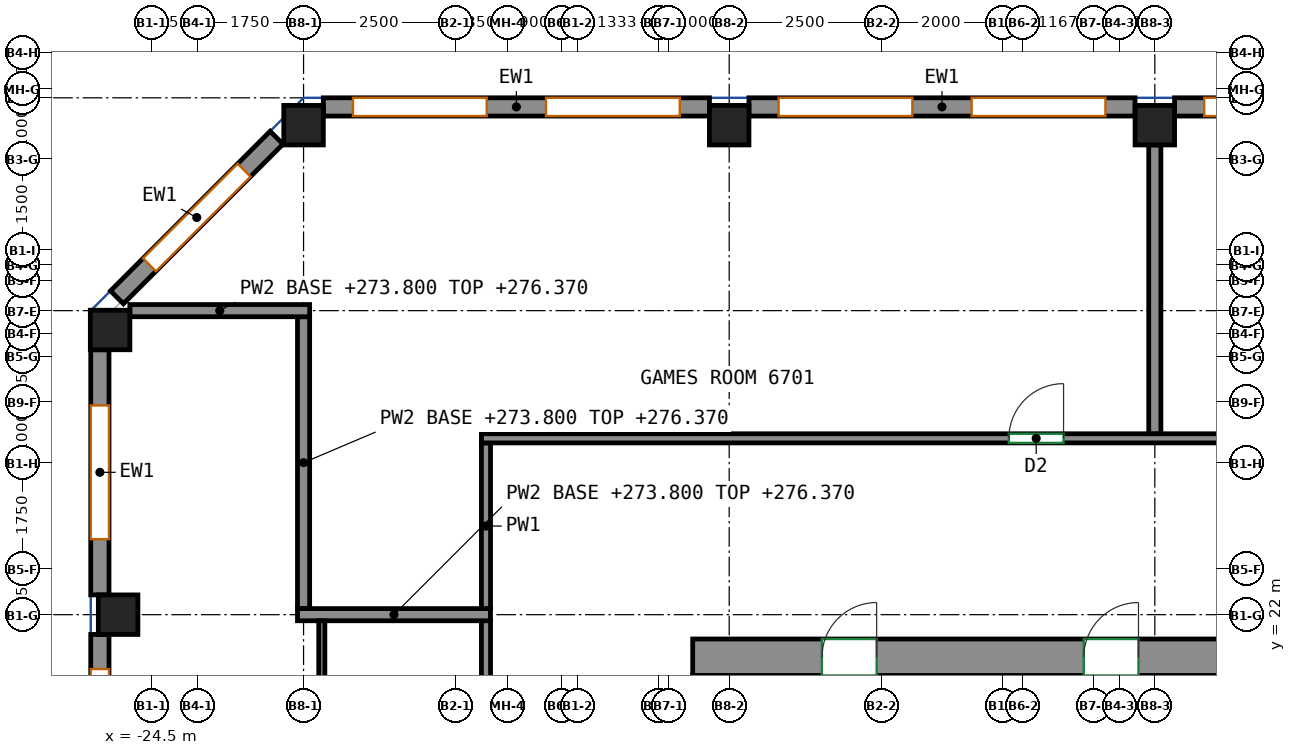
"""IFC4 building model, lengths in metres.
Left out: names, types, materials, properties, quantities, classifications, styles, units other than length and angle.
Written with IfcOpenShell. Run it as: python <this file> out.ifc"""

import sys

from ifc_helpers import new_model, si_unit, direction, frame, frame_2d, origin, origin_2d, place, context, subcontext, project, spatial, rectangle, extrude, source, transform, mapped, element, fill, save


model = new_model("IFC4")
c1 = context("Model", 3, precision=1e-05, world=origin(), true_north=direction((0.0, 1.0)))
c2 = subcontext(c1, "Body", "Model", "MODEL_VIEW")
j1 = project(units=[si_unit("LENGTHUNIT", "METRE"), si_unit("PLANEANGLEUNIT", "RADIAN")], contexts=[c1])
p1 = place(None, origin())
s1 = spatial("IfcSite", under=j1, at=p1, CompositionType="ELEMENT")
p2 = place(p1, origin())
s2 = spatial("IfcBuilding", under=s1, at=p2, CompositionType="ELEMENT")
p3 = place(p2, frame((0.0, 0.0, 273.8)))
s3 = spatial("IfcBuildingStorey", under=s2, at=p3, CompositionType="ELEMENT", Elevation=273.8)
m1 = source(origin(), c2, "Body", "SweptSolid", [
    extrude(rectangle(XDim=0.65, YDim=0.65, at=origin_2d()), origin(), (0.0, 0.0, 1.0), 3.12),
])
for number, where, z_axis, x_axis in (
    (1, (-25.182, 26.682, 0.0), (0.0, 0.0, 1.0), (1.0, 0.0, 0.0)),
    (2, (-25.05, 22.0, 0.0), (0.0, 0.0, 1.0), (1.0, 0.0, 0.0)),
    (3, (-22.0, 30.05, 0.0), (0.0, 0.0, 1.0), (1.0, 0.0, 0.0)),
    (4, (-15.0, 30.05, 0.0), (0.0, 0.0, 1.0), (1.0, 0.0, 0.0)),
    (5, (-8.0, 30.05, 0.0), (0.0, 0.0, 1.0), (1.0, 0.0, 0.0)),
):
    element("IfcColumn", number, at=place(p3, frame(where, z_axis=z_axis, x_axis=x_axis)), inside=s3, PredefinedType="COLUMN", context=c2, shape_type="MappedRepresentation", body=[
        mapped(m1, transform((0.0, 0.0, 0.0))),
    ])
m2 = source(origin(), c2, "Body", "SweptSolid", [
    extrude(rectangle(XDim=33.3, YDim=0.6, at=frame_2d((16.65, 0.0))), origin(), (0.0, 0.0, 1.0), 3.12),
])
p4 = place(p3, frame((-15.6, 21.3, 0.0), z_axis=(0.0, 0.0, 1.0), x_axis=(1.0, 0.0, 0.0)))
e6 = element("IfcWall", 6, at=p4, inside=s3, PredefinedType="SHEAR", context=c2, shape_type="MappedRepresentation", body=[
    mapped(m2, transform((0.0, 0.0, 0.0))),
])
p5 = place(p4, frame((6.431, 0.0, 0.0)))
e7 = element("IfcOpeningElement", 7, at=p5, cuts=e6, PredefinedType="OPENING", context=c2, shape_type="SweptSolid", body=[
    extrude(rectangle(XDim=0.9, YDim=2.1, at=frame_2d((0.45, 1.05))), frame((0.0, 0.31, 0.0), z_axis=(0.0, -1.0, 0.0), x_axis=(1.0, 0.0, 0.0)), (0.0, 0.0, 1.0), 0.62),
])
p6 = place(p4, frame((11.738, 0.0, 0.0)))
e8 = element("IfcOpeningElement", 8, at=p6, cuts=e6, PredefinedType="OPENING", context=c2, shape_type="SweptSolid", body=[
    extrude(rectangle(XDim=0.9, YDim=2.1, at=frame_2d((0.45, 1.05))), frame((0.0, 0.31, 0.0), z_axis=(0.0, -1.0, 0.0), x_axis=(1.0, 0.0, 0.0)), (0.0, 0.0, 1.0), 0.62),
])
p7 = place(p4, frame((17.165, 0.0, 0.0)))
e9 = element("IfcOpeningElement", 9, at=p7, cuts=e6, PredefinedType="OPENING", context=c2, shape_type="SweptSolid", body=[
    extrude(rectangle(XDim=0.9, YDim=2.1, at=frame_2d((0.45, 1.05))), frame((0.0, 0.31, 0.0), z_axis=(0.0, -1.0, 0.0), x_axis=(1.0, 0.0, 0.0)), (0.0, 0.0, 1.0), 0.62),
])
p8 = place(p4, frame((21.386, 0.0, 0.0)))
e10 = element("IfcOpeningElement", 10, at=p8, cuts=e6, PredefinedType="OPENING", context=c2, shape_type="SweptSolid", body=[
    extrude(rectangle(XDim=0.9, YDim=2.1, at=frame_2d((0.45, 1.05))), frame((0.0, 0.31, 0.0), z_axis=(0.0, -1.0, 0.0), x_axis=(1.0, 0.0, 0.0)), (0.0, 0.0, 1.0), 0.62),
])
p9 = place(p4, frame((24.387, 0.0, 0.0)))
e11 = element("IfcOpeningElement", 11, at=p9, cuts=e6, PredefinedType="OPENING", context=c2, shape_type="SweptSolid", body=[
    extrude(rectangle(XDim=0.9, YDim=2.1, at=frame_2d((0.45, 1.05))), frame((0.0, 0.31, 0.0), z_axis=(0.0, -1.0, 0.0), x_axis=(1.0, 0.0, 0.0)), (0.0, 0.0, 1.0), 0.62),
])
p10 = place(p4, frame((26.92, 0.0, 0.0)))
e12 = element("IfcOpeningElement", 12, at=p10, cuts=e6, PredefinedType="OPENING", context=c2, shape_type="SweptSolid", body=[
    extrude(rectangle(XDim=0.9, YDim=2.1, at=frame_2d((0.45, 1.05))), frame((0.0, 0.31, 0.0), z_axis=(0.0, -1.0, 0.0), x_axis=(1.0, 0.0, 0.0)), (0.0, 0.0, 1.0), 0.62),
])
p11 = place(p4, frame((2.125, 0.0, 0.0)))
e13 = element("IfcOpeningElement", 13, at=p11, cuts=e6, PredefinedType="OPENING", context=c2, shape_type="SweptSolid", body=[
    extrude(rectangle(XDim=0.9, YDim=2.1, at=frame_2d((0.45, 1.05))), frame((0.0, 0.31, 0.0), z_axis=(0.0, -1.0, 0.0), x_axis=(1.0, 0.0, 0.0)), (0.0, 0.0, 1.0), 0.62),
])
p12 = place(p4, frame((30.275, 0.0, 0.0)))
e14 = element("IfcOpeningElement", 14, at=p12, cuts=e6, PredefinedType="OPENING", context=c2, shape_type="SweptSolid", body=[
    extrude(rectangle(XDim=0.9, YDim=2.1, at=frame_2d((0.45, 1.05))), frame((0.0, 0.31, 0.0), z_axis=(0.0, -1.0, 0.0), x_axis=(1.0, 0.0, 0.0)), (0.0, 0.0, 1.0), 0.62),
])
m3 = source(origin(), c2, "Body", "SweptSolid", [
    extrude(rectangle(XDim=6.35, YDim=0.3, at=frame_2d((3.175, 0.0))), origin(), (0.0, 0.0, 1.0), 3.12),
])
p13 = place(p3, frame((-1.325, 30.35, 0.0), z_axis=(0.0, 0.0, 1.0), x_axis=(-1.0, 0.0, 0.0)))
e15 = element("IfcWall", 15, at=p13, inside=s3, PredefinedType="SOLIDWALL", context=c2, shape_type="MappedRepresentation", body=[
    mapped(m3, transform((0.0, 0.0, 0.0))),
])
p14 = place(p13, frame((0.488, 0.0, 0.8)))
e16 = element("IfcOpeningElement", 16, at=p14, cuts=e15, PredefinedType="OPENING", context=c2, shape_type="SweptSolid", body=[
    extrude(rectangle(XDim=2.2, YDim=2.05, at=frame_2d((1.1, 1.025))), frame((0.0, 0.16, 0.0), z_axis=(0.0, -1.0, 0.0), x_axis=(1.0, 0.0, 0.0)), (0.0, 0.0, 1.0), 0.32),
])
p15 = place(p13, frame((3.663, 0.0, 0.8)))
e17 = element("IfcOpeningElement", 17, at=p15, cuts=e15, PredefinedType="OPENING", context=c2, shape_type="SweptSolid", body=[
    extrude(rectangle(XDim=2.2, YDim=2.05, at=frame_2d((1.1, 1.025))), frame((0.0, 0.16, 0.0), z_axis=(0.0, -1.0, 0.0), x_axis=(1.0, 0.0, 0.0)), (0.0, 0.0, 1.0), 0.32),
])
p16 = place(p3, frame((-8.325, 30.35, 0.0), z_axis=(0.0, 0.0, 1.0), x_axis=(-1.0, 0.0, 0.0)))
e18 = element("IfcWall", 18, at=p16, inside=s3, PredefinedType="SOLIDWALL", context=c2, shape_type="MappedRepresentation", body=[
    mapped(m3, transform((0.0, 0.0, 0.0))),
])
p17 = place(p16, frame((0.488, 0.0, 0.8)))
e19 = element("IfcOpeningElement", 19, at=p17, cuts=e18, PredefinedType="OPENING", context=c2, shape_type="SweptSolid", body=[
    extrude(rectangle(XDim=2.2, YDim=2.05, at=frame_2d((1.1, 1.025))), frame((0.0, 0.16, 0.0), z_axis=(0.0, -1.0, 0.0), x_axis=(1.0, 0.0, 0.0)), (0.0, 0.0, 1.0), 0.32),
])
p18 = place(p16, frame((3.663, 0.0, 0.8)))
e20 = element("IfcOpeningElement", 20, at=p18, cuts=e18, PredefinedType="OPENING", context=c2, shape_type="SweptSolid", body=[
    extrude(rectangle(XDim=2.2, YDim=2.05, at=frame_2d((1.1, 1.025))), frame((0.0, 0.16, 0.0), z_axis=(0.0, -1.0, 0.0), x_axis=(1.0, 0.0, 0.0)), (0.0, 0.0, 1.0), 0.32),
])
p19 = place(p3, frame((-15.325, 30.35, 0.0), z_axis=(0.0, 0.0, 1.0), x_axis=(-1.0, 0.0, 0.0)))
e21 = element("IfcWall", 21, at=p19, inside=s3, PredefinedType="SOLIDWALL", context=c2, shape_type="MappedRepresentation", body=[
    mapped(m3, transform((0.0, 0.0, 0.0))),
])
p20 = place(p19, frame((0.488, 0.0, 0.8)))
e22 = element("IfcOpeningElement", 22, at=p20, cuts=e21, PredefinedType="OPENING", context=c2, shape_type="SweptSolid", body=[
    extrude(rectangle(XDim=2.2, YDim=2.05, at=frame_2d((1.1, 1.025))), frame((0.0, 0.16, 0.0), z_axis=(0.0, -1.0, 0.0), x_axis=(1.0, 0.0, 0.0)), (0.0, 0.0, 1.0), 0.32),
])
p21 = place(p19, frame((3.663, 0.0, 0.8)))
e23 = element("IfcOpeningElement", 23, at=p21, cuts=e21, PredefinedType="OPENING", context=c2, shape_type="SweptSolid", body=[
    extrude(rectangle(XDim=2.2, YDim=2.05, at=frame_2d((1.1, 1.025))), frame((0.0, 0.16, 0.0), z_axis=(0.0, -1.0, 0.0), x_axis=(1.0, 0.0, 0.0)), (0.0, 0.0, 1.0), 0.32),
])
m4 = source(origin(), c2, "Body", "SweptSolid", [
    extrude(rectangle(XDim=3.712, YDim=0.3, at=frame_2d((1.856, 0.0))), origin(), (0.0, 0.0, 1.0), 3.12),
])
p22 = place(p3, frame((-22.444, 29.844, 0.0), z_axis=(0.0, 0.0, 1.0), x_axis=(-0.707106781187, -0.707106781187, 0.0)))
e24 = element("IfcWall", 24, at=p22, inside=s3, PredefinedType="SOLIDWALL", context=c2, shape_type="MappedRepresentation", body=[
    mapped(m4, transform((0.0, 0.0, 0.0))),
])
p23 = place(p22, frame((0.756, 0.0, 0.8)))
e25 = element("IfcOpeningElement", 25, at=p23, cuts=e24, PredefinedType="OPENING", context=c2, shape_type="SweptSolid", body=[
    extrude(rectangle(XDim=2.2, YDim=2.05, at=frame_2d((1.1, 1.025))), frame((0.0, 0.16, 0.0), z_axis=(0.0, -1.0, 0.0), x_axis=(1.0, 0.0, 0.0)), (0.0, 0.0, 1.0), 0.32),
])
m5 = source(origin(), c2, "Body", "SweptSolid", [
    extrude(rectangle(XDim=4.032, YDim=0.3, at=frame_2d((2.016, 0.0))), origin(), (0.0, 0.0, 1.0), 3.12),
])
p24 = place(p3, frame((-25.35, 26.357, 0.0), z_axis=(0.0, 0.0, 1.0), x_axis=(0.0, -1.0, 0.0)))
e26 = element("IfcWall", 26, at=p24, inside=s3, PredefinedType="SOLIDWALL", context=c2, shape_type="MappedRepresentation", body=[
    mapped(m5, transform((0.0, 0.0, 0.0))),
])
p25 = place(p24, frame((0.916, 0.0, 0.8)))
e27 = element("IfcOpeningElement", 27, at=p25, cuts=e26, PredefinedType="OPENING", context=c2, shape_type="SweptSolid", body=[
    extrude(rectangle(XDim=2.2, YDim=2.05, at=frame_2d((1.1, 1.025))), frame((0.0, 0.16, 0.0), z_axis=(0.0, -1.0, 0.0), x_axis=(1.0, 0.0, 0.0)), (0.0, 0.0, 1.0), 0.32),
])
m6 = source(origin(), c2, "Body", "SweptSolid", [
    extrude(rectangle(XDim=13.35, YDim=0.3, at=frame_2d((6.675, 0.0))), origin(), (0.0, 0.0, 1.0), 3.12),
])
p26 = place(p3, frame((-25.35, 21.675, 0.0), z_axis=(0.0, 0.0, 1.0), x_axis=(0.0, -1.0, 0.0)))
e28 = element("IfcWall", 28, at=p26, inside=s3, PredefinedType="SOLIDWALL", context=c2, shape_type="MappedRepresentation", body=[
    mapped(m6, transform((0.0, 0.0, 0.0))),
])
p27 = place(p26, frame((0.569, 0.0, 0.8)))
e29 = element("IfcOpeningElement", 29, at=p27, cuts=e28, PredefinedType="OPENING", context=c2, shape_type="SweptSolid", body=[
    extrude(rectangle(XDim=2.2, YDim=2.05, at=frame_2d((1.1, 1.025))), frame((0.0, 0.16, 0.0), z_axis=(0.0, -1.0, 0.0), x_axis=(1.0, 0.0, 0.0)), (0.0, 0.0, 1.0), 0.32),
])
p28 = place(p26, frame((3.906, 0.0, 0.8)))
e30 = element("IfcOpeningElement", 30, at=p28, cuts=e28, PredefinedType="OPENING", context=c2, shape_type="SweptSolid", body=[
    extrude(rectangle(XDim=2.2, YDim=2.05, at=frame_2d((1.1, 1.025))), frame((0.0, 0.16, 0.0), z_axis=(0.0, -1.0, 0.0), x_axis=(1.0, 0.0, 0.0)), (0.0, 0.0, 1.0), 0.32),
])
p29 = place(p26, frame((7.244, 0.0, 0.8)))
e31 = element("IfcOpeningElement", 31, at=p29, cuts=e28, PredefinedType="OPENING", context=c2, shape_type="SweptSolid", body=[
    extrude(rectangle(XDim=2.2, YDim=2.05, at=frame_2d((1.1, 1.025))), frame((0.0, 0.16, 0.0), z_axis=(0.0, -1.0, 0.0), x_axis=(1.0, 0.0, 0.0)), (0.0, 0.0, 1.0), 0.32),
])
p30 = place(p26, frame((10.581, 0.0, 0.8)))
e32 = element("IfcOpeningElement", 32, at=p30, cuts=e28, PredefinedType="OPENING", context=c2, shape_type="SweptSolid", body=[
    extrude(rectangle(XDim=2.2, YDim=2.05, at=frame_2d((1.1, 1.025))), frame((0.0, 0.16, 0.0), z_axis=(0.0, -1.0, 0.0), x_axis=(1.0, 0.0, 0.0)), (0.0, 0.0, 1.0), 0.32),
])
p31 = place(p3, frame((-19.0, 22.09, 0.0), z_axis=(0.0, 0.0, 1.0), x_axis=(0.0, 1.0, 0.0)))
e33 = element("IfcWall", 33, at=p31, inside=s3, PredefinedType="PARTITIONING", context=c2, shape_type="SweptSolid", body=[
    extrude(rectangle(XDim=2.735, YDim=0.15, at=frame_2d((1.367, 0.0))), origin(), (0.0, 0.0, 1.0), 3.12),
])
p32 = place(p3, frame((-19.075, 24.9, 0.0), z_axis=(0.0, 0.0, 1.0), x_axis=(1.0, 0.0, 0.0)))
e34 = element("IfcWall", 34, at=p32, inside=s3, PredefinedType="PARTITIONING", context=c2, shape_type="SweptSolid", body=[
    extrude(rectangle(XDim=39.75, YDim=0.15, at=frame_2d((19.875, 0.0))), origin(), (0.0, 0.0, 1.0), 3.12),
])
p33 = place(p32, frame((8.674, 0.0, 0.0)))
e35 = element("IfcOpeningElement", 35, at=p33, cuts=e34, PredefinedType="OPENING", context=c2, shape_type="SweptSolid", body=[
    extrude(rectangle(XDim=0.9, YDim=2.1, at=frame_2d((0.45, 1.05))), frame((0.0, 0.085, 0.0), z_axis=(0.0, -1.0, 0.0), x_axis=(1.0, 0.0, 0.0)), (0.0, 0.0, 1.0), 0.17),
])
p34 = place(p32, frame((13.778, 0.0, 0.0)))
e36 = element("IfcOpeningElement", 36, at=p34, cuts=e34, PredefinedType="OPENING", context=c2, shape_type="SweptSolid", body=[
    extrude(rectangle(XDim=0.9, YDim=2.1, at=frame_2d((0.45, 1.05))), frame((0.0, 0.085, 0.0), z_axis=(0.0, -1.0, 0.0), x_axis=(1.0, 0.0, 0.0)), (0.0, 0.0, 1.0), 0.17),
])
p35 = place(p3, frame((-19.0, 17.28, 0.0), z_axis=(0.0, 0.0, 1.0), x_axis=(0.0, 1.0, 0.0)))
e37 = element("IfcWall", 37, at=p35, inside=s3, PredefinedType="PARTITIONING", context=c2, shape_type="SweptSolid", body=[
    extrude(rectangle(XDim=4.63, YDim=0.15, at=frame_2d((2.315, 0.0))), origin(), (0.0, 0.0, 1.0), 3.12),
])
p36 = place(p3, frame((-8.0, 29.725, 0.0), z_axis=(0.0, 0.0, 1.0), x_axis=(0.0, -1.0, 0.0)))
e38 = element("IfcWall", 38, at=p36, inside=s3, PredefinedType="PARTITIONING", context=c2, shape_type="SweptSolid", body=[
    extrude(rectangle(XDim=4.748, YDim=0.2, at=frame_2d((2.374, 0.0))), origin(), (0.0, 0.0, 1.0), 3.12),
])
p37 = place(p3, frame((-22.0, 22.1, 0.0), z_axis=(0.0, 0.0, 1.0), x_axis=(0.0, 1.0, 0.0)))
e39 = element("IfcWall", 39, at=p37, inside=s3, PredefinedType="PARTITIONING", context=c2, shape_type="SweptSolid", body=[
    extrude(rectangle(XDim=4.8, YDim=0.2, at=frame_2d((2.4, 0.0))), origin(), (0.0, 0.0, 1.0), 2.57),
])
p38 = place(p3, frame((-24.857, 27.0, 0.0), z_axis=(0.0, 0.0, 1.0), x_axis=(1.0, 0.0, 0.0)))
e40 = element("IfcWall", 40, at=p38, inside=s3, PredefinedType="PARTITIONING", context=c2, shape_type="SweptSolid", body=[
    extrude(rectangle(XDim=2.957, YDim=0.2, at=frame_2d((1.479, 0.0))), origin(), (0.0, 0.0, 1.0), 2.57),
])
p39 = place(p3, frame((-22.1, 22.0, 0.0), z_axis=(0.0, 0.0, 1.0), x_axis=(1.0, 0.0, 0.0)))
e41 = element("IfcWall", 41, at=p39, inside=s3, PredefinedType="PARTITIONING", context=c2, shape_type="SweptSolid", body=[
    extrude(rectangle(XDim=3.173, YDim=0.2, at=frame_2d((1.586, 0.0))), origin(), (0.0, 0.0, 1.0), 2.57),
])
p40 = place(p3, frame((-21.7, 19.281, 0.0), z_axis=(0.0, 0.0, 1.0), x_axis=(0.0, 1.0, 0.0)))
e42 = element("IfcWall", 42, at=p40, inside=s3, PredefinedType="PARTITIONING", context=c2, shape_type="SweptSolid", body=[
    extrude(rectangle(XDim=2.619, YDim=0.1, at=frame_2d((1.31, 0.0))), origin(), (0.0, 0.0, 1.0), 2.57),
])
p41 = place(p15, origin())
e43 = element("IfcWindow", 43, at=p41, inside=s3, PartitioningType="SINGLE_PANEL", PredefinedType="WINDOW", context=c2, shape_type="SweptSolid", body=[
    extrude(rectangle(XDim=2.2, YDim=2.05, at=frame_2d((1.1, 1.025))), frame((0.0, 0.03, 0.0), z_axis=(0.0, -1.0, 0.0), x_axis=(1.0, 0.0, 0.0)), (0.0, 0.0, 1.0), 0.06),
])
fill(e17, e43)
p42 = place(p17, origin())
e44 = element("IfcWindow", 44, at=p42, inside=s3, PartitioningType="SINGLE_PANEL", PredefinedType="WINDOW", context=c2, shape_type="SweptSolid", body=[
    extrude(rectangle(XDim=2.2, YDim=2.05, at=frame_2d((1.1, 1.025))), frame((0.0, 0.03, 0.0), z_axis=(0.0, -1.0, 0.0), x_axis=(1.0, 0.0, 0.0)), (0.0, 0.0, 1.0), 0.06),
])
fill(e19, e44)
p43 = place(p18, origin())
e45 = element("IfcWindow", 45, at=p43, inside=s3, PartitioningType="SINGLE_PANEL", PredefinedType="WINDOW", context=c2, shape_type="SweptSolid", body=[
    extrude(rectangle(XDim=2.2, YDim=2.05, at=frame_2d((1.1, 1.025))), frame((0.0, 0.03, 0.0), z_axis=(0.0, -1.0, 0.0), x_axis=(1.0, 0.0, 0.0)), (0.0, 0.0, 1.0), 0.06),
])
fill(e20, e45)
p44 = place(p20, origin())
e46 = element("IfcWindow", 46, at=p44, inside=s3, PartitioningType="SINGLE_PANEL", PredefinedType="WINDOW", context=c2, shape_type="SweptSolid", body=[
    extrude(rectangle(XDim=2.2, YDim=2.05, at=frame_2d((1.1, 1.025))), frame((0.0, 0.03, 0.0), z_axis=(0.0, -1.0, 0.0), x_axis=(1.0, 0.0, 0.0)), (0.0, 0.0, 1.0), 0.06),
])
fill(e22, e46)
p45 = place(p21, origin())
e47 = element("IfcWindow", 47, at=p45, inside=s3, PartitioningType="SINGLE_PANEL", PredefinedType="WINDOW", context=c2, shape_type="SweptSolid", body=[
    extrude(rectangle(XDim=2.2, YDim=2.05, at=frame_2d((1.1, 1.025))), frame((0.0, 0.03, 0.0), z_axis=(0.0, -1.0, 0.0), x_axis=(1.0, 0.0, 0.0)), (0.0, 0.0, 1.0), 0.06),
])
fill(e23, e47)
p46 = place(p23, origin())
e48 = element("IfcWindow", 48, at=p46, inside=s3, PartitioningType="SINGLE_PANEL", PredefinedType="WINDOW", context=c2, shape_type="SweptSolid", body=[
    extrude(rectangle(XDim=2.2, YDim=2.05, at=frame_2d((1.1, 1.025))), frame((0.0, 0.03, 0.0), z_axis=(0.0, -1.0, 0.0), x_axis=(1.0, 0.0, 0.0)), (0.0, 0.0, 1.0), 0.06),
])
fill(e25, e48)
p47 = place(p25, origin())
e49 = element("IfcWindow", 49, at=p47, inside=s3, PartitioningType="SINGLE_PANEL", PredefinedType="WINDOW", context=c2, shape_type="SweptSolid", body=[
    extrude(rectangle(XDim=2.2, YDim=2.05, at=frame_2d((1.1, 1.025))), frame((0.0, 0.03, 0.0), z_axis=(0.0, -1.0, 0.0), x_axis=(1.0, 0.0, 0.0)), (0.0, 0.0, 1.0), 0.06),
])
fill(e27, e49)
p48 = place(p27, origin())
e50 = element("IfcWindow", 50, at=p48, inside=s3, PartitioningType="SINGLE_PANEL", PredefinedType="WINDOW", context=c2, shape_type="SweptSolid", body=[
    extrude(rectangle(XDim=2.2, YDim=2.05, at=frame_2d((1.1, 1.025))), frame((0.0, 0.03, 0.0), z_axis=(0.0, -1.0, 0.0), x_axis=(1.0, 0.0, 0.0)), (0.0, 0.0, 1.0), 0.06),
])
fill(e29, e50)
p49 = place(p5, origin())
e51 = element("IfcDoor", 51, at=p49, inside=s3, OperationType="SINGLE_SWING_RIGHT", PredefinedType="DOOR", context=c2, shape_type="SweptSolid", body=[
    extrude(rectangle(XDim=0.9, YDim=2.1, at=frame_2d((0.45, 1.05))), frame((0.0, -0.155, 0.0), z_axis=(0.0, -1.0, 0.0), x_axis=(1.0, 0.0, 0.0)), (0.0, 0.0, 1.0), 0.05),
])
fill(e7, e51)
p50 = place(p11, origin())
e52 = element("IfcDoor", 52, at=p50, inside=s3, OperationType="SINGLE_SWING_RIGHT", PredefinedType="DOOR", context=c2, shape_type="SweptSolid", body=[
    extrude(rectangle(XDim=0.9, YDim=2.1, at=frame_2d((0.45, 1.05))), frame((0.0, -0.155, 0.0), z_axis=(0.0, -1.0, 0.0), x_axis=(1.0, 0.0, 0.0)), (0.0, 0.0, 1.0), 0.05),
])
fill(e13, e52)
p51 = place(p33, origin())
e53 = element("IfcDoor", 53, at=p51, inside=s3, OperationType="SINGLE_SWING_RIGHT", PredefinedType="DOOR", context=c2, shape_type="SweptSolid", body=[
    extrude(rectangle(XDim=0.9, YDim=2.1, at=frame_2d((0.45, 1.05))), frame((0.0, 0.025, 0.0), z_axis=(0.0, -1.0, 0.0), x_axis=(1.0, 0.0, 0.0)), (0.0, 0.0, 1.0), 0.05),
])
fill(e35, e53)
save(model, sys.argv[1])
